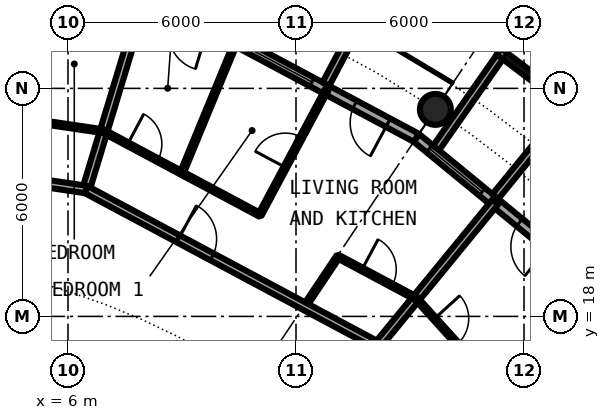
"""IFC4 building model, lengths in metres.
Left out: names, types, materials, properties, quantities, classifications, styles, units other than length and angle.
Written with IfcOpenShell. Run it as: python <this file> out.ifc"""

import sys

from ifc_helpers import new_model, si_unit, direction, frame, frame_2d, origin, origin_2d, place, context, subcontext, project, spatial, rectangle, circle, hollow_circle, extrude, element, fill, save


model = new_model("IFC4")
c1 = context("Model", 3, precision=1e-05, world=origin(), true_north=direction((0.0, 1.0)))
c2 = subcontext(c1, "Body", "Model", "MODEL_VIEW")
j1 = project(units=[si_unit("LENGTHUNIT", "METRE"), si_unit("PLANEANGLEUNIT", "RADIAN")], contexts=[c1])
p1 = place(None, origin())
s1 = spatial("IfcSite", under=j1, at=p1, CompositionType="ELEMENT")
p2 = place(p1, origin())
s2 = spatial("IfcBuilding", under=s1, at=p2, CompositionType="ELEMENT")
p3 = place(p2, frame((0.0, 0.0, 212.7)))
s3 = spatial("IfcBuildingStorey", under=s2, at=p3, CompositionType="ELEMENT", Elevation=212.7)
p4 = place(p3, frame((15.667, 23.448, 0.0), z_axis=(0.0, 0.0, 1.0), x_axis=(1.0, 0.0, 0.0)))
e1 = element("IfcColumn", 1, at=p4, inside=s3, PredefinedType="COLUMN", context=c2, shape_type="SweptSolid", body=[
    extrude(hollow_circle(Radius=0.406, WallThickness=0.03, at=origin_2d()), origin(), (0.0, 0.0, 1.0), 3.05),
])
p5 = place(p3, frame((19.304, 19.304, 0.0), z_axis=(0.0, 0.0, 1.0), x_axis=(-0.773019449054, 0.634382322723, 0.0)))
e2 = element("IfcWall", 2, at=p5, inside=s3, PredefinedType="SOLIDWALL", context=c2, shape_type="SweptSolid", body=[
    extrude(rectangle(XDim=5.352, YDim=0.25, at=frame_2d((2.676, 0.0))), origin(), (0.0, 0.0, 1.0), 2.7),
])
p6 = place(p5, frame((0.841, 0.0, 0.0)))
e3 = element("IfcOpeningElement", 3, at=p6, cuts=e2, PredefinedType="OPENING", context=c2, shape_type="SweptSolid", body=[
    extrude(rectangle(XDim=1.0, YDim=2.2, at=frame_2d((0.5, 1.1))), frame((0.0, 0.135, 0.0), z_axis=(0.0, -1.0, 0.0), x_axis=(1.0, 0.0, 0.0)), (0.0, 0.0, 1.0), 0.27),
])
p7 = place(p5, frame((3.111, 0.0, 0.3)))
e4 = element("IfcOpeningElement", 4, at=p7, cuts=e2, PredefinedType="OPENING", context=c2, shape_type="SweptSolid", body=[
    extrude(rectangle(XDim=1.8, YDim=2.1, at=frame_2d((0.9, 1.05))), frame((0.0, 0.135, 0.0), z_axis=(0.0, -1.0, 0.0), x_axis=(1.0, 0.0, 0.0)), (0.0, 0.0, 1.0), 0.27),
])
p8 = place(p3, frame((19.289, 23.497, -0.03), z_axis=(0.0, 0.0, 1.0), x_axis=(-0.797887588059, 0.602806268067, 0.0)))
e5 = element("IfcWall", 5, at=p8, inside=s3, PredefinedType="SOLIDWALL", context=c2, shape_type="SweptSolid", body=[
    extrude(rectangle(XDim=2.447, YDim=0.2, at=frame_2d((1.223, 0.0))), origin(), (0.0, 0.0, 1.0), 2.73),
])
p9 = place(p8, frame((0.183, 0.0, 0.33)))
e6 = element("IfcOpeningElement", 6, at=p9, cuts=e5, PredefinedType="OPENING", context=c2, shape_type="SweptSolid", body=[
    extrude(circle(Radius=1.04, at=frame_2d((1.04, 1.04))), frame((0.0, 0.11, 0.0), z_axis=(0.0, -1.0, 0.0), x_axis=(1.0, 0.0, 0.0)), (0.0, 0.0, 1.0), 0.22),
])
p10 = place(p3, frame((17.246, 21.155, -0.03), z_axis=(0.0, 0.0, 1.0), x_axis=(0.631741648902, 0.775179004516, 0.0)))
e7 = element("IfcWall", 7, at=p10, inside=s3, PredefinedType="SOLIDWALL", context=c2, shape_type="SweptSolid", body=[
    extrude(rectangle(XDim=3.006, YDim=0.2, at=frame_2d((1.503, 0.0))), origin(), (0.0, 0.0, 1.0), 2.73),
])
p11 = place(p3, frame((15.688, 22.433, -0.03), z_axis=(0.0, 0.0, 1.0), x_axis=(0.573260687834, 0.819373043115, 0.0)))
e8 = element("IfcWall", 8, at=p11, inside=s3, PredefinedType="SOLIDWALL", context=c2, shape_type="SweptSolid", body=[
    extrude(rectangle(XDim=2.925, YDim=0.2, at=frame_2d((1.463, 0.0))), origin(), (0.0, 0.0, 1.0), 2.73),
])
p12 = place(p3, frame((15.167, 22.699, 0.0), z_axis=(0.0, 0.0, 1.0), x_axis=(-0.881915646801, 0.471407246368, 0.0)))
e9 = element("IfcWall", 9, at=p12, inside=s3, PredefinedType="SOLIDWALL", context=c2, shape_type="SweptSolid", body=[
    extrude(rectangle(XDim=5.352, YDim=0.25, at=frame_2d((2.676, 0.0))), origin(), (0.0, 0.0, 1.0), 2.7),
])
p13 = place(p12, frame((0.841, 0.0, 0.0)))
e10 = element("IfcOpeningElement", 10, at=p13, cuts=e9, PredefinedType="OPENING", context=c2, shape_type="SweptSolid", body=[
    extrude(rectangle(XDim=1.0, YDim=2.2, at=frame_2d((0.5, 1.1))), frame((0.0, 0.135, 0.0), z_axis=(0.0, -1.0, 0.0), x_axis=(1.0, 0.0, 0.0)), (0.0, 0.0, 1.0), 0.27),
])
p14 = place(p12, frame((3.111, 0.0, 0.3)))
e11 = element("IfcOpeningElement", 11, at=p14, cuts=e9, PredefinedType="OPENING", context=c2, shape_type="SweptSolid", body=[
    extrude(rectangle(XDim=1.8, YDim=2.1, at=frame_2d((0.9, 1.05))), frame((0.0, 0.135, 0.0), z_axis=(0.0, -1.0, 0.0), x_axis=(1.0, 0.0, 0.0)), (0.0, 0.0, 1.0), 0.27),
])
p15 = place(p3, frame((12.787, 24.113, -0.03), z_axis=(0.0, 0.0, 1.0), x_axis=(0.468365282436, 0.883534924159, 0.0)))
e12 = element("IfcWall", 12, at=p15, inside=s3, PredefinedType="SOLIDWALL", context=c2, shape_type="SweptSolid", body=[
    extrude(rectangle(XDim=3.006, YDim=0.2, at=frame_2d((1.503, 0.0))), origin(), (0.0, 0.0, 1.0), 2.73),
])
p16 = place(p3, frame((6.474, 21.34, 0.0), z_axis=(0.0, 0.0, 1.0), x_axis=(0.290053269332, 0.957010502006, 0.0)))
e13 = element("IfcWall", 13, at=p16, inside=s3, PredefinedType="PARTITIONING", context=c2, shape_type="SweptSolid", body=[
    extrude(rectangle(XDim=4.874, YDim=0.2, at=frame_2d((2.437, 0.0))), origin(), (0.0, 0.0, 1.0), 2.7),
])
p17 = place(p3, frame((8.994, 21.772, 0.0), z_axis=(0.0, 0.0, 1.0), x_axis=(0.381733837918, 0.924272295911, 0.0)))
e14 = element("IfcWall", 14, at=p17, inside=s3, PredefinedType="PARTITIONING", context=c2, shape_type="SweptSolid", body=[
    extrude(rectangle(XDim=3.618, YDim=0.1, at=frame_2d((1.809, 0.0))), origin(), (0.0, 0.0, 1.0), 2.7),
])
p18 = place(p3, frame((11.05, 20.673, 0.0), z_axis=(0.0, 0.0, 1.0), x_axis=(0.471372010014, 0.881934480659, 0.0)))
e15 = element("IfcWall", 15, at=p18, inside=s3, PredefinedType="PARTITIONING", context=c2, shape_type="SweptSolid", body=[
    extrude(rectangle(XDim=3.734, YDim=0.1, at=frame_2d((1.867, 0.0))), origin(), (0.0, 0.0, 1.0), 2.7),
])
p19 = place(p18, frame((1.417, 0.0, 0.0)))
e16 = element("IfcOpeningElement", 16, at=p19, cuts=e15, PredefinedType="OPENING", context=c2, shape_type="SweptSolid", body=[
    extrude(rectangle(XDim=0.9, YDim=2.3, at=frame_2d((0.45, 1.15))), frame((0.0, 0.06, 0.0), z_axis=(0.0, -1.0, 0.0), x_axis=(1.0, 0.0, 0.0)), (0.0, 0.0, 1.0), 0.12),
])
p20 = place(p3, frame((12.229, 18.264, 0.0), z_axis=(0.0, 0.0, 1.0), x_axis=(0.556271671389, 0.83100049796, 0.0)))
e17 = element("IfcWall", 17, at=p20, inside=s3, PredefinedType="PARTITIONING", context=c2, shape_type="SweptSolid", body=[
    extrude(rectangle(XDim=1.576, YDim=0.1, at=frame_2d((0.788, 0.0))), origin(), (0.0, 0.0, 1.0), 2.7),
])
p21 = place(p3, frame((14.147, 17.238, 0.0), z_axis=(0.0, 0.0, 1.0), x_axis=(0.634374159378, 0.773026148273, 0.0)))
e18 = element("IfcWall", 18, at=p21, inside=s3, PredefinedType="PARTITIONING", context=c2, shape_type="SweptSolid", body=[
    extrude(rectangle(XDim=4.876, YDim=0.2, at=frame_2d((2.438, 0.0))), origin(), (0.0, 0.0, 1.0), 2.7),
])
p22 = place(p3, frame((6.473, 21.34, 0.0), z_axis=(0.0, 0.0, 1.0), x_axis=(0.881912965532, -0.471412262491, 0.0)))
e19 = element("IfcWall", 19, at=p22, inside=s3, PredefinedType="PARTITIONING", context=c2, shape_type="SweptSolid", body=[
    extrude(rectangle(XDim=8.702, YDim=0.2, at=frame_2d((4.351, 0.0))), origin(), (0.0, 0.0, 1.0), 2.7),
])
p23 = place(p22, frame((2.764, 0.0, 0.0)))
e20 = element("IfcOpeningElement", 20, at=p23, cuts=e19, PredefinedType="OPENING", context=c2, shape_type="SweptSolid", body=[
    extrude(rectangle(XDim=1.0, YDim=2.3, at=frame_2d((0.5, 1.15))), frame((0.0, 0.11, 0.0), z_axis=(0.0, -1.0, 0.0), x_axis=(1.0, 0.0, 0.0)), (0.0, 0.0, 1.0), 0.22),
])
p24 = place(p3, frame((0.0, 22.3, 0.0), z_axis=(0.0, 0.0, 1.0), x_axis=(0.989181015112, -0.146700100005, 0.0)))
e21 = element("IfcWall", 21, at=p24, inside=s3, PredefinedType="PARTITIONING", context=c2, shape_type="SweptSolid", body=[
    extrude(rectangle(XDim=6.544, YDim=0.2, at=frame_2d((3.272, 0.0))), origin(), (0.0, 0.0, 1.0), 2.7),
])
p25 = place(p24, frame((3.863, 0.0, 0.0)))
e22 = element("IfcOpeningElement", 22, at=p25, cuts=e21, PredefinedType="OPENING", context=c2, shape_type="SweptSolid", body=[
    extrude(rectangle(XDim=1.0, YDim=2.3, at=frame_2d((0.5, 1.15))), frame((0.0, 0.11, 0.0), z_axis=(0.0, -1.0, 0.0), x_axis=(1.0, 0.0, 0.0)), (0.0, 0.0, 1.0), 0.22),
])
p26 = place(p3, frame((6.938, 22.871, 0.0), z_axis=(0.0, 0.0, 1.0), x_axis=(0.881916280728, -0.471406060405, 0.0)))
e23 = element("IfcWall", 23, at=p26, inside=s3, PredefinedType="PARTITIONING", context=c2, shape_type="SweptSolid", body=[
    extrude(rectangle(XDim=4.663, YDim=0.1, at=frame_2d((2.331, 0.0))), origin(), (0.0, 0.0, 1.0), 2.7),
])
p27 = place(p26, frame((0.716, 0.0, 0.0)))
e24 = element("IfcOpeningElement", 24, at=p27, cuts=e23, PredefinedType="OPENING", context=c2, shape_type="SweptSolid", body=[
    extrude(rectangle(XDim=0.9, YDim=2.3, at=frame_2d((0.45, 1.15))), frame((0.0, 0.06, 0.0), z_axis=(0.0, -1.0, 0.0), x_axis=(1.0, 0.0, 0.0)), (0.0, 0.0, 1.0), 0.12),
])
p28 = place(p3, frame((13.106, 19.574, 0.0), z_axis=(0.0, 0.0, 1.0), x_axis=(0.881949682246, -0.471343566824, 0.0)))
e25 = element("IfcWall", 25, at=p28, inside=s3, PredefinedType="PARTITIONING", context=c2, shape_type="SweptSolid", body=[
    extrude(rectangle(XDim=2.331, YDim=0.1, at=frame_2d((1.166, 0.0))), origin(), (0.0, 0.0, 1.0), 2.7),
])
p29 = place(p28, frame((0.716, 0.0, 0.0)))
e26 = element("IfcOpeningElement", 26, at=p29, cuts=e25, PredefinedType="OPENING", context=c2, shape_type="SweptSolid", body=[
    extrude(rectangle(XDim=0.9, YDim=2.3, at=frame_2d((0.45, 1.15))), frame((0.0, 0.06, 0.0), z_axis=(0.0, -1.0, 0.0), x_axis=(1.0, 0.0, 0.0)), (0.0, 0.0, 1.0), 0.12),
])
p30 = place(p3, frame((4.625, 23.214, 0.0), z_axis=(0.0, 0.0, 1.0), x_axis=(0.989181588285, -0.146696235121, 0.0)))
e27 = element("IfcWall", 27, at=p30, inside=s3, PredefinedType="PARTITIONING", context=c2, shape_type="SweptSolid", body=[
    extrude(rectangle(XDim=2.338, YDim=0.1, at=frame_2d((1.169, 0.0))), origin(), (0.0, 0.0, 1.0), 2.7),
])
p31 = place(p3, frame((15.162, 18.475, 0.0), z_axis=(0.0, 0.0, 1.0), x_axis=(0.671528384412, -0.740978831634, 0.0)))
e28 = element("IfcWall", 28, at=p31, inside=s3, PredefinedType="PARTITIONING", context=c2, shape_type="SweptSolid", body=[
    extrude(rectangle(XDim=2.338, YDim=0.1, at=frame_2d((1.169, 0.0))), origin(), (0.0, 0.0, 1.0), 2.7),
])
p32 = place(p31, frame((0.719, 0.0, 0.0)))
e29 = element("IfcOpeningElement", 29, at=p32, cuts=e28, PredefinedType="OPENING", context=c2, shape_type="SweptSolid", body=[
    extrude(rectangle(XDim=0.9, YDim=2.3, at=frame_2d((0.45, 1.15))), frame((0.0, 0.06, 0.0), z_axis=(0.0, -1.0, 0.0), x_axis=(1.0, 0.0, 0.0)), (0.0, 0.0, 1.0), 0.12),
])
p33 = place(p6, origin())
e30 = element("IfcDoor", 30, at=p33, inside=s3, OperationType="SINGLE_SWING_LEFT", PredefinedType="DOOR", context=c2, shape_type="SweptSolid", body=[
    extrude(rectangle(XDim=1.0, YDim=2.2, at=frame_2d((0.5, 1.1))), frame((0.0, 0.025, 0.0), z_axis=(0.0, -1.0, 0.0), x_axis=(1.0, 0.0, 0.0)), (0.0, 0.0, 1.0), 0.05),
])
fill(e3, e30)
p34 = place(p7, origin())
e31 = element("IfcWindow", 31, at=p34, inside=s3, PartitioningType="SINGLE_PANEL", PredefinedType="WINDOW", context=c2, shape_type="SweptSolid", body=[
    extrude(rectangle(XDim=1.8, YDim=2.1, at=frame_2d((0.9, 1.05))), frame((0.0, 0.03, 0.0), z_axis=(0.0, -1.0, 0.0), x_axis=(1.0, 0.0, 0.0)), (0.0, 0.0, 1.0), 0.06),
])
fill(e4, e31)
p35 = place(p9, origin())
e32 = element("IfcWindow", 32, at=p35, inside=s3, PartitioningType="SINGLE_PANEL", PredefinedType="WINDOW", context=c2, shape_type="SweptSolid", body=[
    extrude(circle(Radius=1.04, at=frame_2d((1.04, 1.04))), frame((0.0, 0.03, 0.0), z_axis=(0.0, -1.0, 0.0), x_axis=(1.0, 0.0, 0.0)), (0.0, 0.0, 1.0), 0.06),
])
fill(e6, e32)
p36 = place(p13, origin())
e33 = element("IfcDoor", 33, at=p36, inside=s3, OperationType="SINGLE_SWING_LEFT", PredefinedType="DOOR", context=c2, shape_type="SweptSolid", body=[
    extrude(rectangle(XDim=1.0, YDim=2.2, at=frame_2d((0.5, 1.1))), frame((0.0, 0.025, 0.0), z_axis=(0.0, -1.0, 0.0), x_axis=(1.0, 0.0, 0.0)), (0.0, 0.0, 1.0), 0.05),
])
fill(e10, e33)
p37 = place(p14, origin())
e34 = element("IfcWindow", 34, at=p37, inside=s3, PartitioningType="SINGLE_PANEL", PredefinedType="WINDOW", context=c2, shape_type="SweptSolid", body=[
    extrude(rectangle(XDim=1.8, YDim=2.1, at=frame_2d((0.9, 1.05))), frame((0.0, 0.03, 0.0), z_axis=(0.0, -1.0, 0.0), x_axis=(1.0, 0.0, 0.0)), (0.0, 0.0, 1.0), 0.06),
])
fill(e11, e34)
p38 = place(p32, origin())
e35 = element("IfcDoor", 35, at=p38, inside=s3, OperationType="SINGLE_SWING_LEFT", PredefinedType="DOOR", context=c2, shape_type="SweptSolid", body=[
    extrude(rectangle(XDim=0.9, YDim=2.3, at=frame_2d((0.45, 1.15))), frame((0.0, 0.025, 0.0), z_axis=(0.0, -1.0, 0.0), x_axis=(1.0, 0.0, 0.0)), (0.0, 0.0, 1.0), 0.05),
])
fill(e29, e35)
p39 = place(p23, origin())
e36 = element("IfcDoor", 36, at=p39, inside=s3, OperationType="SINGLE_SWING_LEFT", PredefinedType="DOOR", context=c2, shape_type="SweptSolid", body=[
    extrude(rectangle(XDim=1.0, YDim=2.3, at=frame_2d((0.5, 1.15))), frame((0.0, 0.025, 0.0), z_axis=(0.0, -1.0, 0.0), x_axis=(1.0, 0.0, 0.0)), (0.0, 0.0, 1.0), 0.05),
])
fill(e20, e36)
p40 = place(p29, origin())
e37 = element("IfcDoor", 37, at=p40, inside=s3, OperationType="SINGLE_SWING_LEFT", PredefinedType="DOOR", context=c2, shape_type="SweptSolid", body=[
    extrude(rectangle(XDim=0.9, YDim=2.3, at=frame_2d((0.45, 1.15))), frame((0.0, 0.025, 0.0), z_axis=(0.0, -1.0, 0.0), x_axis=(1.0, 0.0, 0.0)), (0.0, 0.0, 1.0), 0.05),
])
fill(e26, e37)
p41 = place(p19, origin())
e38 = element("IfcDoor", 38, at=p41, inside=s3, OperationType="SINGLE_SWING_LEFT", PredefinedType="DOOR", context=c2, shape_type="SweptSolid", body=[
    extrude(rectangle(XDim=0.9, YDim=2.3, at=frame_2d((0.45, 1.15))), frame((0.0, 0.025, 0.0), z_axis=(0.0, -1.0, 0.0), x_axis=(1.0, 0.0, 0.0)), (0.0, 0.0, 1.0), 0.05),
])
fill(e16, e38)
p42 = place(p27, origin())
e39 = element("IfcDoor", 39, at=p42, inside=s3, OperationType="SINGLE_SWING_LEFT", PredefinedType="DOOR", context=c2, shape_type="SweptSolid", body=[
    extrude(rectangle(XDim=0.9, YDim=2.3, at=frame_2d((0.45, 1.15))), frame((0.0, 0.025, 0.0), z_axis=(0.0, -1.0, 0.0), x_axis=(1.0, 0.0, 0.0)), (0.0, 0.0, 1.0), 0.05),
])
fill(e24, e39)
save(model, sys.argv[1])
